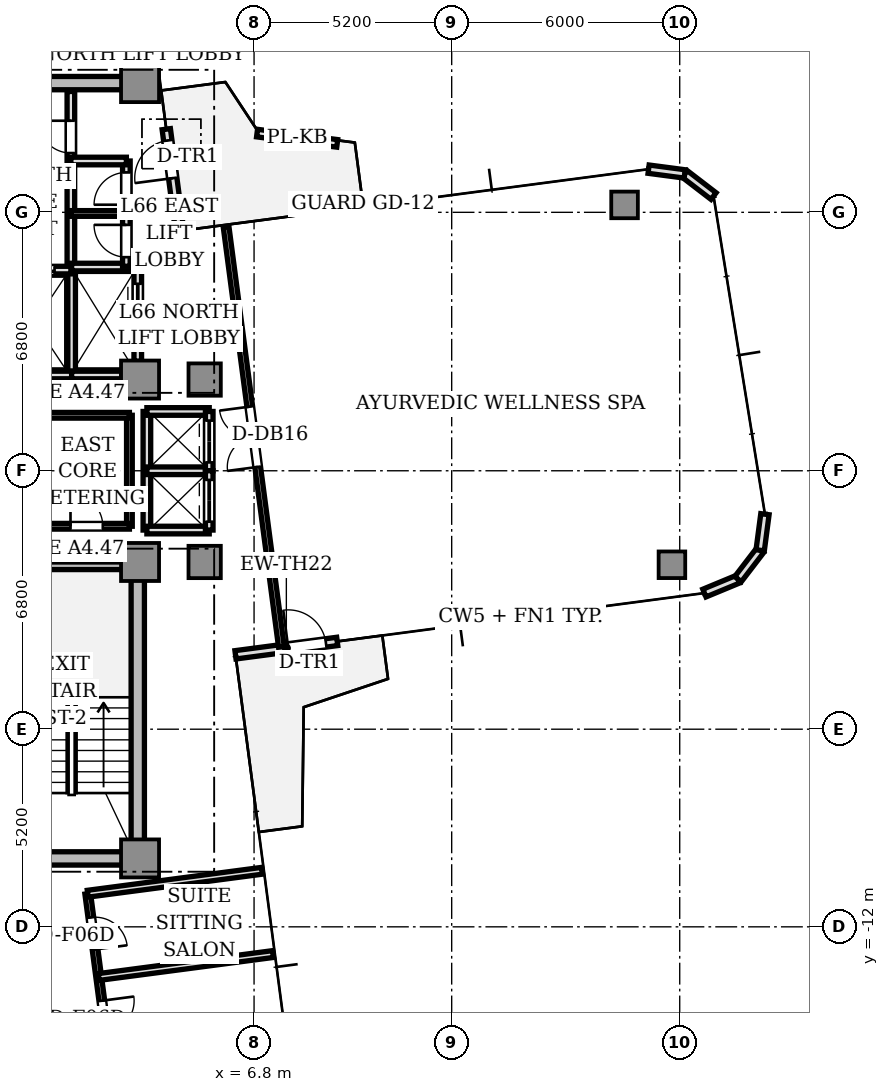
"""IFC4 building model, lengths in metres.
Left out: names, types, materials, properties, quantities, classifications, styles, units other than length and angle.
Written with IfcOpenShell. Run it as: python <this file> out.ifc"""

import sys

from ifc_helpers import new_model, si_unit, direction, frame, frame_2d, origin, origin_2d, place, context, subcontext, project, spatial, rectangle, extrude, source, transform, mapped, element, fill, save


model = new_model("IFC4")
c1 = context("Model", 3, precision=1e-05, world=origin(), true_north=direction((0.0, 1.0)))
c2 = subcontext(c1, "Body", "Model", "MODEL_VIEW")
j1 = project(units=[si_unit("LENGTHUNIT", "METRE"), si_unit("PLANEANGLEUNIT", "RADIAN")], contexts=[c1])
p1 = place(None, origin())
s1 = spatial("IfcSite", under=j1, at=p1, CompositionType="ELEMENT")
p2 = place(p1, origin())
s2 = spatial("IfcBuilding", under=s1, at=p2, CompositionType="ELEMENT")
p3 = place(p2, frame((0.0, 0.0, 237.8)))
s3 = spatial("IfcBuildingStorey", under=s2, at=p3, CompositionType="ELEMENT", Elevation=237.8)
for number, where, z_axis, x_axis in (
    (1, (-3.55, 10.2, 0.0), (0.0, 0.0, 1.0), (1.0, 0.0, 0.0)),
    (2, (-3.55, -10.2, 0.0), (0.0, 0.0, 1.0), (1.0, 0.0, 0.0)),
):
    element("IfcWall", number, at=place(p3, frame(where, z_axis=z_axis, x_axis=x_axis)), inside=s3, PredefinedType="SHEAR", context=c2, shape_type="SweptSolid", body=[
        extrude(rectangle(XDim=7.1, YDim=0.35, at=frame_2d((3.55, 0.0))), origin(), (0.0, 0.0, 1.0), 3.11),
    ])
p4 = place(p3, frame((3.74, -9.75, 0.0), z_axis=(0.0, 0.0, 1.0), x_axis=(0.0, 1.0, 0.0)))
e3 = element("IfcWall", 3, at=p4, inside=s3, PredefinedType="SHEAR", context=c2, shape_type="SweptSolid", body=[
    extrude(rectangle(XDim=6.9, YDim=0.35, at=frame_2d((3.45, 0.0))), origin(), (0.0, 0.0, 1.0), 3.11),
])
m1 = source(origin(), c2, "Body", "SweptSolid", [
    extrude(rectangle(XDim=1.0, YDim=1.0, at=origin_2d()), origin(), (0.0, 0.0, 1.0), 3.11),
])
for number, where, z_axis, x_axis in (
    (4, (3.8, 2.4, 0.0), (0.0, 0.0, 1.0), (1.0, 0.0, 0.0)),
    (5, (3.8, 10.2, 0.0), (0.0, 0.0, 1.0), (1.0, 0.0, 0.0)),
    (6, (3.8, -2.4, 0.0), (0.0, 0.0, 1.0), (1.0, 0.0, 0.0)),
    (7, (3.8, -10.2, 0.0), (0.0, 0.0, 1.0), (1.0, 0.0, 0.0)),
):
    element("IfcColumn", number, at=place(p3, frame(where, z_axis=z_axis, x_axis=x_axis)), inside=s3, PredefinedType="COLUMN", context=c2, shape_type="MappedRepresentation", body=[
        mapped(m1, transform((0.0, 0.0, 0.0), scale=1.0)),
    ])
m2 = source(origin(), c2, "Body", "SweptSolid", [
    extrude(rectangle(XDim=0.85, YDim=0.85, at=origin_2d()), origin(), (0.0, 0.0, 1.0), 3.11),
])
for number, where, z_axis, x_axis in (
    (8, (5.5, 2.4, 0.0), (0.0, 0.0, 1.0), (1.0, 0.0, 0.0)),
    (9, (5.5, -2.4, 0.0), (0.0, 0.0, 1.0), (1.0, 0.0, 0.0)),
):
    element("IfcColumn", number, at=place(p3, frame(where, z_axis=z_axis, x_axis=x_axis)), inside=s3, PredefinedType="COLUMN", context=c2, shape_type="MappedRepresentation", body=[
        mapped(m2, transform((0.0, 0.0, 0.0), scale=1.0)),
    ])
m3 = source(origin(), c2, "Body", "SweptSolid", [
    extrude(rectangle(XDim=0.7, YDim=0.7, at=origin_2d()), origin(), (0.0, 0.0, 1.0), 3.11),
])
for number, where, z_axis, x_axis in (
    (10, (17.795, -2.473, 0.0), (0.0, 0.0, 1.0), (1.0, 0.0, 0.0)),
    (11, (16.549, 6.995, 0.0), (0.0, 0.0, 1.0), (1.0, 0.0, 0.0)),
):
    element("IfcColumn", number, at=place(p3, frame(where, z_axis=z_axis, x_axis=x_axis)), inside=s3, PredefinedType="COLUMN", context=c2, shape_type="MappedRepresentation", body=[
        mapped(m3, transform((0.0, 0.0, 0.0), scale=1.0)),
    ])
p5 = place(p3, frame((6.311, -4.843, 0.0), z_axis=(0.0, 0.0, 1.0), x_axis=(0.991439824936, 0.130564442062, 0.0)))
e12 = element("IfcWall", 12, at=p5, inside=s3, PredefinedType="STANDARD", context=c2, shape_type="SweptSolid", body=[
    extrude(rectangle(XDim=2.7, YDim=0.22, at=frame_2d((1.35, 0.0))), origin(), (0.0, 0.0, 1.0), 3.11),
])
p6 = place(p5, frame((1.4, 0.0, 0.0)))
e13 = element("IfcOpeningElement", 13, at=p6, cuts=e12, PredefinedType="OPENING", context=c2, shape_type="SweptSolid", body=[
    extrude(rectangle(XDim=1.0, YDim=2.2, at=frame_2d((0.5, 1.1))), frame((0.0, 0.12, 0.0), z_axis=(0.0, -1.0, 0.0), x_axis=(1.0, 0.0, 0.0)), (0.0, 0.0, 1.0), 0.24),
])
p7 = place(p3, frame((18.65, -3.218, 0.0), z_axis=(0.0, 0.0, 1.0), x_axis=(0.923889442397, 0.382659506909, 0.0)))
e14 = element("IfcWall", 14, at=p7, inside=s3, PredefinedType="STANDARD", context=c2, shape_type="SweptSolid", body=[
    extrude(rectangle(XDim=0.958, YDim=0.22, at=frame_2d((0.479, 0.0))), origin(), (0.0, 0.0, 1.0), 3.11),
])
p8 = place(p3, frame((19.534, -2.852, 0.0), z_axis=(0.0, 0.0, 1.0), x_axis=(0.60861352168, 0.793466811674, 0.0)))
e15 = element("IfcWall", 15, at=p8, inside=s3, PredefinedType="STANDARD", context=c2, shape_type="SweptSolid", body=[
    extrude(rectangle(XDim=0.958, YDim=0.22, at=frame_2d((0.479, 0.0))), origin(), (0.0, 0.0, 1.0), 3.11),
])
for number, where, z_axis, x_axis in (
    (16, (20.117, -2.092, 0.0), (0.0, 0.0, 1.0), (0.131, 0.991, 0.0)),
    (17, (18.89, 7.228, 0.0), (0.0, 0.0, 1.0), (-0.793, 0.609, 0.0)),
    (18, (18.131, 7.811, 0.0), (0.0, 0.0, 1.0), (-0.991, 0.131, 0.0)),
):
    element("IfcWall", number, at=place(p3, frame(where, z_axis=z_axis, x_axis=x_axis)), inside=s3, PredefinedType="STANDARD", context=c2, shape_type="SweptSolid", body=[
        extrude(rectangle(XDim=0.958, YDim=0.22, at=frame_2d((0.479, 0.0))), origin(), (0.0, 0.0, 1.0), 3.11),
    ])
p9 = place(p3, frame((4.843, 6.311, 0.0), z_axis=(0.0, 0.0, 1.0), x_axis=(-0.130564442062, 0.991439824936, 0.0)))
e19 = element("IfcWall", 19, at=p9, inside=s3, PredefinedType="STANDARD", context=c2, shape_type="SweptSolid", body=[
    extrude(rectangle(XDim=2.7, YDim=0.22, at=frame_2d((1.35, 0.0))), origin(), (0.0, 0.0, 1.0), 3.11),
])
p10 = place(p9, frame((1.4, 0.0, 0.0)))
e20 = element("IfcOpeningElement", 20, at=p10, cuts=e19, PredefinedType="OPENING", context=c2, shape_type="SweptSolid", body=[
    extrude(rectangle(XDim=1.0, YDim=2.2, at=frame_2d((0.5, 1.1))), frame((0.0, 0.12, 0.0), z_axis=(0.0, -1.0, 0.0), x_axis=(1.0, 0.0, 0.0)), (0.0, 0.0, 1.0), 0.24),
])
p11 = place(p3, frame((8.988, 8.615, 0.0), z_axis=(0.0, 0.0, 1.0), x_axis=(-0.991889831907, 0.12710059543, 0.0)))
e21 = element("IfcWall", 21, at=p11, inside=s3, PredefinedType="PARAPET", context=c2, shape_type="SweptSolid", body=[
    extrude(rectangle(XDim=2.126, YDim=0.2, at=frame_2d((1.063, 0.0))), origin(), (0.0, 0.0, 1.0), 0.65),
])
p12 = place(p3, frame((0.0, -2.5, 0.0), z_axis=(0.0, 0.0, 1.0), x_axis=(1.0, 0.0, 0.0)))
e22 = element("IfcWall", 22, at=p12, inside=s3, PredefinedType="SOLIDWALL", context=c2, shape_type="SweptSolid", body=[
    extrude(rectangle(XDim=3.72, YDim=0.2, at=frame_2d((1.86, 0.0))), origin(), (0.0, 0.0, 1.0), 3.11),
])
p13 = place(p3, frame((1.98, 5.32, 0.0), z_axis=(0.0, 0.0, 1.0), x_axis=(0.0, 1.0, 0.0)))
e23 = element("IfcWall", 23, at=p13, inside=s3, PredefinedType="SOLIDWALL", context=c2, shape_type="SweptSolid", body=[
    extrude(rectangle(XDim=4.66, YDim=0.2, at=frame_2d((2.33, 0.0))), origin(), (0.0, 0.0, 1.0), 2.66),
])
p14 = place(p13, frame((3.04, 0.0, 0.0)))
e24 = element("IfcOpeningElement", 24, at=p14, cuts=e23, PredefinedType="OPENING", context=c2, shape_type="SweptSolid", body=[
    extrude(rectangle(XDim=0.85, YDim=2.1, at=frame_2d((0.425, 1.05))), frame((0.0, 0.11, 0.0), z_axis=(0.0, -1.0, 0.0), x_axis=(1.0, 0.0, 0.0)), (0.0, 0.0, 1.0), 0.22),
])
p15 = place(p3, frame((2.0, 2.5, 0.0), z_axis=(0.0, 0.0, 1.0), x_axis=(0.0, 1.0, 0.0)))
e25 = element("IfcWall", 25, at=p15, inside=s3, PredefinedType="SOLIDWALL", context=c2, shape_type="SweptSolid", body=[
    extrude(rectangle(XDim=2.78, YDim=0.2, at=frame_2d((1.39, 0.0))), origin(), (0.0, 0.0, 1.0), 2.66),
])
p16 = place(p3, frame((0.05, 2.52, 0.0), z_axis=(0.0, 0.0, 1.0), x_axis=(1.0, 0.0, 0.0)))
e26 = element("IfcWall", 26, at=p16, inside=s3, PredefinedType="SOLIDWALL", context=c2, shape_type="SweptSolid", body=[
    extrude(rectangle(XDim=1.95, YDim=0.2, at=frame_2d((0.975, 0.0))), origin(), (0.0, 0.0, 1.0), 2.66),
])
p17 = place(p3, frame((0.05, 5.28, 0.0), z_axis=(0.0, 0.0, 1.0), x_axis=(1.0, 0.0, 0.0)))
e27 = element("IfcWall", 27, at=p17, inside=s3, PredefinedType="SOLIDWALL", context=c2, shape_type="SweptSolid", body=[
    extrude(rectangle(XDim=1.93, YDim=0.2, at=frame_2d((0.965, 0.0))), origin(), (0.0, 0.0, 1.0), 2.66),
])
p18 = place(p17, frame((0.4, 0.0, 0.0)))
e28 = element("IfcOpeningElement", 28, at=p18, cuts=e27, PredefinedType="OPENING", context=c2, shape_type="SweptSolid", body=[
    extrude(rectangle(XDim=1.1, YDim=2.2, at=frame_2d((0.55, 1.1))), frame((0.0, 0.11, 0.0), z_axis=(0.0, -1.0, 0.0), x_axis=(1.0, 0.0, 0.0)), (0.0, 0.0, 1.0), 0.22),
])
p19 = place(p3, frame((2.0, 2.52, 0.0), z_axis=(0.0, 0.0, 1.0), x_axis=(1.0, 0.0, 0.0)))
e29 = element("IfcWall", 29, at=p19, inside=s3, PredefinedType="SOLIDWALL", context=c2, shape_type="SweptSolid", body=[
    extrude(rectangle(XDim=1.32, YDim=0.2, at=frame_2d((0.66, 0.0))), origin(), (0.0, 0.0, 1.0), 2.66),
])
p20 = place(p3, frame((2.0, 5.36, 0.0), z_axis=(0.0, 0.0, 1.0), x_axis=(1.0, 0.0, 0.0)))
e30 = element("IfcWall", 30, at=p20, inside=s3, PredefinedType="SOLIDWALL", context=c2, shape_type="SweptSolid", body=[
    extrude(rectangle(XDim=1.74, YDim=0.2, at=frame_2d((0.87, 0.0))), origin(), (0.0, 0.0, 1.0), 2.66),
])
p21 = place(p3, frame((3.74, 2.88, 0.0), z_axis=(0.0, 0.0, 1.0), x_axis=(0.0, 1.0, 0.0)))
e31 = element("IfcWall", 31, at=p21, inside=s3, PredefinedType="SOLIDWALL", context=c2, shape_type="SweptSolid", body=[
    extrude(rectangle(XDim=2.48, YDim=0.2, at=frame_2d((1.24, 0.0))), origin(), (0.0, 0.0, 1.0), 2.66),
])
p22 = place(p21, frame((0.84, 0.0, 0.0)))
e32 = element("IfcOpeningElement", 32, at=p22, cuts=e31, PredefinedType="OPENING", context=c2, shape_type="SweptSolid", body=[
    extrude(rectangle(XDim=1.2, YDim=2.2, at=frame_2d((0.6, 1.1))), frame((0.0, 0.11, 0.0), z_axis=(0.0, -1.0, 0.0), x_axis=(1.0, 0.0, 0.0)), (0.0, 0.0, 1.0), 0.22),
])
p23 = place(p3, frame((3.98, -1.56, 0.0), z_axis=(0.0, 0.0, 1.0), x_axis=(0.0, 1.0, 0.0)))
e33 = element("IfcWall", 33, at=p23, inside=s3, PredefinedType="SOLIDWALL", context=c2, shape_type="SweptSolid", body=[
    extrude(rectangle(XDim=3.12, YDim=0.2, at=frame_2d((1.56, 0.0))), origin(), (0.0, 0.0, 1.0), 2.33),
])
for number, where, z_axis, x_axis in (
    (34, (3.98, 1.56, 0.0), (0.0, 0.0, 1.0), (1.0, 0.0, 0.0)),
    (35, (3.98, -1.56, 0.0), (0.0, 0.0, 1.0), (1.0, 0.0, 0.0)),
    (36, (3.98, 0.0, 0.0), (0.0, 0.0, 1.0), (1.0, 0.0, 0.0)),
):
    element("IfcWall", number, at=place(p3, frame(where, z_axis=z_axis, x_axis=x_axis)), inside=s3, PredefinedType="SOLIDWALL", context=c2, shape_type="SweptSolid", body=[
        extrude(rectangle(XDim=1.64, YDim=0.2, at=frame_2d((0.82, 0.0))), origin(), (0.0, 0.0, 1.0), 2.66),
    ])
p24 = place(p3, frame((5.62, 0.0, 0.0), z_axis=(0.0, 0.0, 1.0), x_axis=(0.0, 1.0, 0.0)))
e37 = element("IfcWall", 37, at=p24, inside=s3, PredefinedType="SOLIDWALL", context=c2, shape_type="SweptSolid", body=[
    extrude(rectangle(XDim=1.56, YDim=0.2, at=frame_2d((0.78, 0.0))), origin(), (0.0, 0.0, 1.0), 2.66),
])
p25 = place(p24, frame((0.22, 0.0, 0.0)))
e38 = element("IfcOpeningElement", 38, at=p25, cuts=e37, PredefinedType="OPENING", context=c2, shape_type="SweptSolid", body=[
    extrude(rectangle(XDim=1.1, YDim=2.2, at=frame_2d((0.55, 1.1))), frame((0.0, 0.11, 0.0), z_axis=(0.0, -1.0, 0.0), x_axis=(1.0, 0.0, 0.0)), (0.0, 0.0, 1.0), 0.22),
])
p26 = place(p3, frame((5.62, -1.56, 0.0), z_axis=(0.0, 0.0, 1.0), x_axis=(0.0, 1.0, 0.0)))
e39 = element("IfcWall", 39, at=p26, inside=s3, PredefinedType="SOLIDWALL", context=c2, shape_type="SweptSolid", body=[
    extrude(rectangle(XDim=1.56, YDim=0.2, at=frame_2d((0.78, 0.0))), origin(), (0.0, 0.0, 1.0), 2.66),
])
p27 = place(p26, frame((0.22, 0.0, 0.0)))
e40 = element("IfcOpeningElement", 40, at=p27, cuts=e39, PredefinedType="OPENING", context=c2, shape_type="SweptSolid", body=[
    extrude(rectangle(XDim=1.1, YDim=2.2, at=frame_2d((0.55, 1.1))), frame((0.0, 0.11, 0.0), z_axis=(0.0, -1.0, 0.0), x_axis=(1.0, 0.0, 0.0)), (0.0, 0.0, 1.0), 0.22),
])
p28 = place(p3, frame((3.44, 5.38, 0.0), z_axis=(0.0, 0.0, 1.0), x_axis=(0.0, 1.0, 0.0)))
e41 = element("IfcWall", 41, at=p28, inside=s3, PredefinedType="SOLIDWALL", context=c2, shape_type="SweptSolid", body=[
    extrude(rectangle(XDim=2.77, YDim=0.2, at=frame_2d((1.385, 0.0))), origin(), (0.0, 0.0, 1.0), 2.66),
])
p29 = place(p28, frame((0.24, 0.0, 0.0)))
e42 = element("IfcOpeningElement", 42, at=p29, cuts=e41, PredefinedType="OPENING", context=c2, shape_type="SweptSolid", body=[
    extrude(rectangle(XDim=0.85, YDim=2.1, at=frame_2d((0.425, 1.05))), frame((0.0, 0.11, 0.0), z_axis=(0.0, -1.0, 0.0), x_axis=(1.0, 0.0, 0.0)), (0.0, 0.0, 1.0), 0.22),
])
p30 = place(p28, frame((1.62, 0.0, 0.0)))
e43 = element("IfcOpeningElement", 43, at=p30, cuts=e41, PredefinedType="OPENING", context=c2, shape_type="SweptSolid", body=[
    extrude(rectangle(XDim=0.85, YDim=2.1, at=frame_2d((0.425, 1.05))), frame((0.0, 0.11, 0.0), z_axis=(0.0, -1.0, 0.0), x_axis=(1.0, 0.0, 0.0)), (0.0, 0.0, 1.0), 0.22),
])
p31 = place(p3, frame((1.98, 8.15, 0.0), z_axis=(0.0, 0.0, 1.0), x_axis=(1.0, 0.0, 0.0)))
e44 = element("IfcWall", 44, at=p31, inside=s3, PredefinedType="SOLIDWALL", context=c2, shape_type="SweptSolid", body=[
    extrude(rectangle(XDim=1.46, YDim=0.2, at=frame_2d((0.73, 0.0))), origin(), (0.0, 0.0, 1.0), 2.66),
])
p32 = place(p3, frame((1.98, 6.77, 0.0), z_axis=(0.0, 0.0, 1.0), x_axis=(1.0, 0.0, 0.0)))
e45 = element("IfcWall", 45, at=p32, inside=s3, PredefinedType="PARTITIONING", context=c2, shape_type="SweptSolid", body=[
    extrude(rectangle(XDim=1.46, YDim=0.15, at=frame_2d((0.73, 0.0))), origin(), (0.0, 0.0, 1.0), 2.66),
])
p33 = place(p3, frame((3.52, -1.46, 0.0), z_axis=(0.0, 0.0, 1.0), x_axis=(0.0, 1.0, 0.0)))
e46 = element("IfcWall", 46, at=p33, inside=s3, PredefinedType="PARTITIONING", context=c2, shape_type="SweptSolid", body=[
    extrude(rectangle(XDim=2.92, YDim=0.15, at=frame_2d((1.46, 0.0))), origin(), (0.0, 0.0, 1.0), 2.33),
])
p34 = place(p3, frame((1.32, 1.46, 0.0), z_axis=(0.0, 0.0, 1.0), x_axis=(1.0, 0.0, 0.0)))
e47 = element("IfcWall", 47, at=p34, inside=s3, PredefinedType="PARTITIONING", context=c2, shape_type="SweptSolid", body=[
    extrude(rectangle(XDim=2.2, YDim=0.15, at=frame_2d((1.1, 0.0))), origin(), (0.0, 0.0, 1.0), 2.66),
])
p35 = place(p3, frame((1.32, -1.46, 0.0), z_axis=(0.0, 0.0, 1.0), x_axis=(1.0, 0.0, 0.0)))
e48 = element("IfcWall", 48, at=p35, inside=s3, PredefinedType="PARTITIONING", context=c2, shape_type="SweptSolid", body=[
    extrude(rectangle(XDim=2.2, YDim=0.15, at=frame_2d((1.1, 0.0))), origin(), (0.0, 0.0, 1.0), 2.66),
])
p36 = place(p35, frame((0.65, 0.0, 0.0)))
e49 = element("IfcOpeningElement", 49, at=p36, cuts=e48, PredefinedType="OPENING", context=c2, shape_type="SweptSolid", body=[
    extrude(rectangle(XDim=0.85, YDim=2.1, at=frame_2d((0.425, 1.05))), frame((0.0, 0.085, 0.0), z_axis=(0.0, -1.0, 0.0), x_axis=(1.0, 0.0, 0.0)), (0.0, 0.0, 1.0), 0.17),
])
p37 = place(p3, frame((7.519, -4.633, 0.0), z_axis=(0.0, 0.0, 1.0), x_axis=(-0.130521347626, 0.991445499165, 0.0)))
e50 = element("IfcWall", 50, at=p37, inside=s3, PredefinedType="PARTITIONING", context=c2, shape_type="SweptSolid", body=[
    extrude(rectangle(XDim=11.15, YDim=0.15, at=frame_2d((5.575, 0.0))), origin(), (0.0, 0.0, 1.0), 2.66),
])
p38 = place(p37, frame((4.775, 0.0, 0.0)))
e51 = element("IfcOpeningElement", 51, at=p38, cuts=e50, PredefinedType="OPENING", context=c2, shape_type="SweptSolid", body=[
    extrude(rectangle(XDim=1.6, YDim=2.25, at=frame_2d((0.8, 1.125))), frame((0.0, 0.085, 0.0), z_axis=(0.0, -1.0, 0.0), x_axis=(1.0, 0.0, 0.0)), (0.0, 0.0, 1.0), 0.17),
])
p39 = place(p3, frame((2.423, -11.129, 0.0), z_axis=(0.0, 0.0, 1.0), x_axis=(0.130524526471, -0.991445080672, 0.0)))
e52 = element("IfcWall", 52, at=p39, inside=s3, PredefinedType="PARTITIONING", context=c2, shape_type="SweptSolid", body=[
    extrude(rectangle(XDim=4.42, YDim=0.15, at=frame_2d((2.21, 0.0))), origin(), (0.0, 0.0, 1.0), 2.66),
])
p40 = place(p39, frame((0.63, 0.0, 0.0)))
e53 = element("IfcOpeningElement", 53, at=p40, cuts=e52, PredefinedType="OPENING", context=c2, shape_type="SweptSolid", body=[
    extrude(rectangle(XDim=0.85, YDim=2.1, at=frame_2d((0.425, 1.05))), frame((0.0, 0.085, 0.0), z_axis=(0.0, -1.0, 0.0), x_axis=(1.0, 0.0, 0.0)), (0.0, 0.0, 1.0), 0.17),
])
p41 = place(p39, frame((2.84, 0.0, 0.0)))
e54 = element("IfcOpeningElement", 54, at=p41, cuts=e52, PredefinedType="OPENING", context=c2, shape_type="SweptSolid", body=[
    extrude(rectangle(XDim=0.85, YDim=2.1, at=frame_2d((0.425, 1.05))), frame((0.0, 0.085, 0.0), z_axis=(0.0, -1.0, 0.0), x_axis=(1.0, 0.0, 0.0)), (0.0, 0.0, 1.0), 0.17),
])
p42 = place(p3, frame((2.423, -11.129, 0.0), z_axis=(0.0, 0.0, 1.0), x_axis=(0.991442792852, 0.130541903244, 0.0)))
e55 = element("IfcWall", 55, at=p42, inside=s3, PredefinedType="PARTITIONING", context=c2, shape_type="SweptSolid", body=[
    extrude(rectangle(XDim=4.625, YDim=0.18, at=frame_2d((2.312, 0.0))), origin(), (0.0, 0.0, 1.0), 2.66),
])
p43 = place(p3, frame((2.712, -13.32, 0.0), z_axis=(0.0, 0.0, 1.0), x_axis=(0.99144189323, 0.130548735528, 0.0)))
e56 = element("IfcWall", 56, at=p43, inside=s3, PredefinedType="PARTITIONING", context=c2, shape_type="SweptSolid", body=[
    extrude(rectangle(XDim=4.625, YDim=0.18, at=frame_2d((2.312, 0.0))), origin(), (0.0, 0.0, 1.0), 2.66),
])
m4 = source(origin(), c2, "Body", "SweptSolid", [
    extrude(rectangle(XDim=1.0, YDim=0.05, at=origin_2d()), origin(), (0.0, 0.0, 1.0), 2.2),
])
p44 = place(p6, frame((0.5, 0.0, 0.0)))
e57 = element("IfcDoor", 57, at=p44, inside=s3, OperationType="SINGLE_SWING_LEFT", PredefinedType="DOOR", context=c2, shape_type="MappedRepresentation", body=[
    mapped(m4, transform((0.0, 0.0, 0.0), scale=1.0)),
])
fill(e13, e57)
p45 = place(p10, frame((0.5, 0.0, 0.0)))
e58 = element("IfcDoor", 58, at=p45, inside=s3, OperationType="SINGLE_SWING_LEFT", PredefinedType="DOOR", context=c2, shape_type="MappedRepresentation", body=[
    mapped(m4, transform((0.0, 0.0, 0.0), scale=1.0)),
])
fill(e20, e58)
m5 = source(origin(), c2, "Body", "SweptSolid", [
    extrude(rectangle(XDim=0.85, YDim=0.05, at=origin_2d()), origin(), (0.0, 0.0, 1.0), 2.1),
])
p46 = place(p14, frame((0.425, 0.0, 0.0)))
e59 = element("IfcDoor", 59, at=p46, inside=s3, OperationType="SINGLE_SWING_RIGHT", PredefinedType="DOOR", context=c2, shape_type="MappedRepresentation", body=[
    mapped(m5, transform((0.0, 0.0, 0.0), scale=1.0)),
])
fill(e24, e59)
m6 = source(origin(), c2, "Body", "SweptSolid", [
    extrude(rectangle(XDim=1.1, YDim=0.05, at=origin_2d()), origin(), (0.0, 0.0, 1.0), 2.2),
])
p47 = place(p18, frame((0.55, 0.0, 0.0)))
e60 = element("IfcDoor", 60, at=p47, inside=s3, OperationType="DOUBLE_DOOR_SLIDING", PredefinedType="DOOR", context=c2, shape_type="MappedRepresentation", body=[
    mapped(m6, transform((0.0, 0.0, 0.0), scale=1.0)),
])
fill(e28, e60)
m7 = source(origin(), c2, "Body", "SweptSolid", [
    extrude(rectangle(XDim=1.2, YDim=0.05, at=origin_2d()), origin(), (0.0, 0.0, 1.0), 2.2),
])
p48 = place(p22, frame((0.6, 0.0, 0.0)))
e61 = element("IfcDoor", 61, at=p48, inside=s3, OperationType="DOUBLE_DOOR_SLIDING", PredefinedType="DOOR", context=c2, shape_type="MappedRepresentation", body=[
    mapped(m7, transform((0.0, 0.0, 0.0), scale=1.0)),
])
fill(e32, e61)
p49 = place(p25, frame((0.55, 0.0, 0.0)))
e62 = element("IfcDoor", 62, at=p49, inside=s3, OperationType="DOUBLE_DOOR_SLIDING", PredefinedType="DOOR", context=c2, shape_type="MappedRepresentation", body=[
    mapped(m6, transform((0.0, 0.0, 0.0), scale=1.0)),
])
fill(e38, e62)
p50 = place(p27, frame((0.55, 0.0, 0.0)))
e63 = element("IfcDoor", 63, at=p50, inside=s3, OperationType="DOUBLE_DOOR_SLIDING", PredefinedType="DOOR", context=c2, shape_type="MappedRepresentation", body=[
    mapped(m6, transform((0.0, 0.0, 0.0), scale=1.0)),
])
fill(e40, e63)
p51 = place(p29, frame((0.425, 0.0, 0.0)))
e64 = element("IfcDoor", 64, at=p51, inside=s3, OperationType="SINGLE_SWING_RIGHT", PredefinedType="DOOR", context=c2, shape_type="MappedRepresentation", body=[
    mapped(m5, transform((0.0, 0.0, 0.0), scale=1.0)),
])
fill(e42, e64)
p52 = place(p30, frame((0.425, 0.0, 0.0)))
e65 = element("IfcDoor", 65, at=p52, inside=s3, OperationType="SINGLE_SWING_LEFT", PredefinedType="DOOR", context=c2, shape_type="MappedRepresentation", body=[
    mapped(m5, transform((0.0, 0.0, 0.0), scale=1.0)),
])
fill(e43, e65)
p53 = place(p36, frame((0.425, 0.0, 0.0)))
e66 = element("IfcDoor", 66, at=p53, inside=s3, OperationType="SINGLE_SWING_LEFT", PredefinedType="DOOR", context=c2, shape_type="MappedRepresentation", body=[
    mapped(m5, transform((0.0, 0.0, 0.0), scale=1.0)),
])
fill(e49, e66)
m8 = source(origin(), c2, "Body", "SweptSolid", [
    extrude(rectangle(XDim=1.6, YDim=0.05, at=origin_2d()), origin(), (0.0, 0.0, 1.0), 2.25),
])
p54 = place(p38, frame((0.8, 0.0, 0.0)))
e67 = element("IfcDoor", 67, at=p54, inside=s3, OperationType="DOUBLE_DOOR_SINGLE_SWING", PredefinedType="DOOR", context=c2, shape_type="MappedRepresentation", body=[
    mapped(m8, transform((0.0, 0.0, 0.0), scale=1.0)),
])
fill(e51, e67)
p55 = place(p40, frame((0.425, 0.0, 0.0)))
e68 = element("IfcDoor", 68, at=p55, inside=s3, OperationType="SINGLE_SWING_RIGHT", PredefinedType="DOOR", context=c2, shape_type="MappedRepresentation", body=[
    mapped(m5, transform((0.0, 0.0, 0.0), scale=1.0)),
])
fill(e53, e68)
p56 = place(p41, frame((0.425, 0.0, 0.0)))
e69 = element("IfcDoor", 69, at=p56, inside=s3, OperationType="SINGLE_SWING_LEFT", PredefinedType="DOOR", context=c2, shape_type="MappedRepresentation", body=[
    mapped(m5, transform((0.0, 0.0, 0.0), scale=1.0)),
])
fill(e54, e69)
save(model, sys.argv[1])
